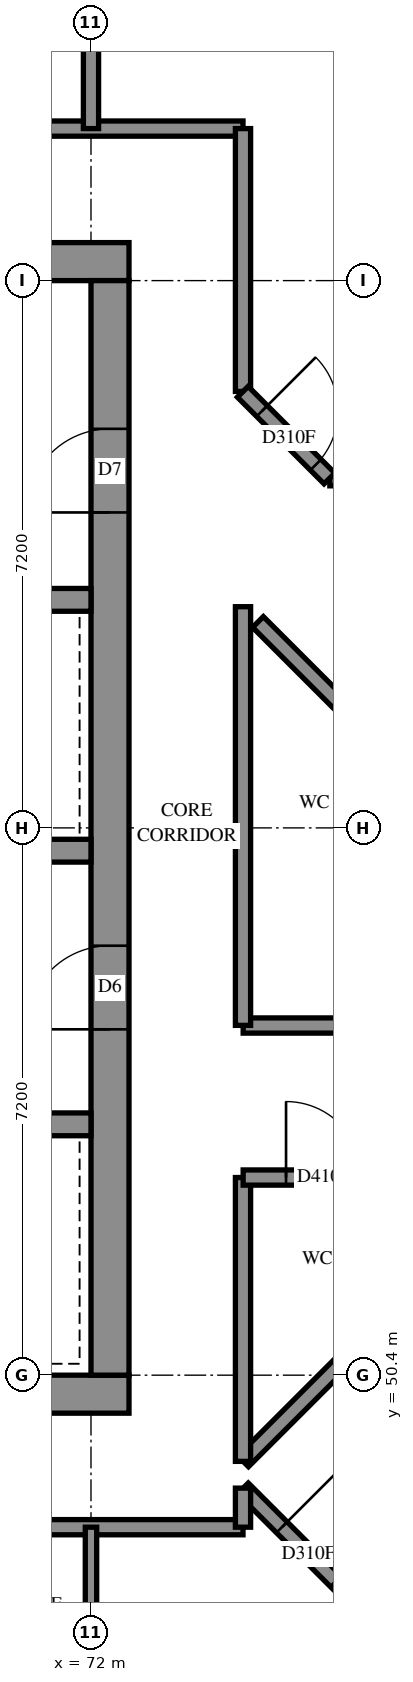
"""IFC4 building model, lengths in metres.
Left out: names, types, materials, properties, quantities, classifications, styles, units other than length and angle.
Written with IfcOpenShell. Run it as: python <this file> out.ifc"""

import sys

from ifc_helpers import new_model, si_unit, direction, frame, frame_2d, origin, place, context, subcontext, project, spatial, rectangle, extrude, element, fill, save


model = new_model("IFC4")
c1 = context("Model", 3, precision=1e-05, world=origin(), true_north=direction((0.0, 1.0)))
c2 = subcontext(c1, "Body", "Model", "MODEL_VIEW")
j1 = project(units=[si_unit("LENGTHUNIT", "METRE"), si_unit("PLANEANGLEUNIT", "RADIAN")], contexts=[c1])
p1 = place(None, origin())
s1 = spatial("IfcSite", under=j1, at=p1, CompositionType="ELEMENT")
p2 = place(p1, origin())
s2 = spatial("IfcBuilding", under=s1, at=p2, CompositionType="ELEMENT")
p3 = place(p2, frame((0.0, 0.0, 189.6)))
s3 = spatial("IfcBuildingStorey", under=s2, at=p3, CompositionType="ELEMENT", Elevation=189.6)
p4 = place(p3, frame((57.1, 50.15, -0.3), z_axis=(0.0, 0.0, 1.0), x_axis=(1.0, 0.0, 0.0)))
e1 = element("IfcWall", 1, at=p4, inside=s3, PredefinedType="SHEAR", context=c2, shape_type="SweptSolid", body=[
    extrude(rectangle(XDim=15.4, YDim=0.5, at=frame_2d((7.7, 0.0))), origin(), (0.0, 0.0, 1.0), 2.7),
])
p5 = place(p3, frame((57.1, 65.05, -0.3), z_axis=(0.0, 0.0, 1.0), x_axis=(1.0, 0.0, 0.0)))
e2 = element("IfcWall", 2, at=p5, inside=s3, PredefinedType="SHEAR", context=c2, shape_type="SweptSolid", body=[
    extrude(rectangle(XDim=15.4, YDim=0.5, at=frame_2d((7.7, 0.0))), origin(), (0.0, 0.0, 1.0), 2.7),
])
p6 = place(p5, frame((10.5, 0.0, 0.3)))
e3 = element("IfcOpeningElement", 3, at=p6, cuts=e2, PredefinedType="OPENING", context=c2, shape_type="SweptSolid", body=[
    extrude(rectangle(XDim=0.8, YDim=2.1, at=frame_2d((0.4, 1.05))), frame((0.0, 0.26, 0.0), z_axis=(0.0, -1.0, 0.0), x_axis=(1.0, 0.0, 0.0)), (0.0, 0.0, 1.0), 0.52),
])
p7 = place(p3, frame((72.25, 50.4, -0.3), z_axis=(0.0, 0.0, 1.0), x_axis=(0.0, 1.0, 0.0)))
e4 = element("IfcWall", 4, at=p7, inside=s3, PredefinedType="SHEAR", context=c2, shape_type="SweptSolid", body=[
    extrude(rectangle(XDim=14.4, YDim=0.5, at=frame_2d((7.2, 0.0))), origin(), (0.0, 0.0, 1.0), 2.7),
])
p8 = place(p7, frame((4.55, 0.0, 0.3)))
e5 = element("IfcOpeningElement", 5, at=p8, cuts=e4, PredefinedType="OPENING", context=c2, shape_type="SweptSolid", body=[
    extrude(rectangle(XDim=1.1, YDim=2.1, at=frame_2d((0.55, 1.05))), frame((0.0, 0.26, 0.0), z_axis=(0.0, -1.0, 0.0), x_axis=(1.0, 0.0, 0.0)), (0.0, 0.0, 1.0), 0.52),
])
p9 = place(p7, frame((11.35, 0.0, 0.3)))
e6 = element("IfcOpeningElement", 6, at=p9, cuts=e4, PredefinedType="OPENING", context=c2, shape_type="SweptSolid", body=[
    extrude(rectangle(XDim=1.1, YDim=2.1, at=frame_2d((0.55, 1.05))), frame((0.0, 0.26, 0.0), z_axis=(0.0, -1.0, 0.0), x_axis=(1.0, 0.0, 0.0)), (0.0, 0.0, 1.0), 0.52),
])
p10 = place(p3, frame((57.6, 53.7, 0.0), z_axis=(0.0, 0.0, 1.0), x_axis=(1.0, 0.0, 0.0)))
e7 = element("IfcWall", 7, at=p10, inside=s3, PredefinedType="SOLIDWALL", context=c2, shape_type="SweptSolid", body=[
    extrude(rectangle(XDim=14.4, YDim=0.3, at=frame_2d((7.2, 0.0))), origin(), (0.0, 0.0, 1.0), 3.1),
])
p11 = place(p10, frame((1.35, 0.0, 0.0)))
e8 = element("IfcOpeningElement", 8, at=p11, cuts=e7, PredefinedType="OPENING", context=c2, shape_type="SweptSolid", body=[
    extrude(rectangle(XDim=0.9, YDim=2.1, at=frame_2d((0.45, 1.05))), frame((0.0, 0.16, 0.0), z_axis=(0.0, -1.0, 0.0), x_axis=(1.0, 0.0, 0.0)), (0.0, 0.0, 1.0), 0.32),
])
p12 = place(p10, frame((4.95, 0.0, 0.0)))
e9 = element("IfcOpeningElement", 9, at=p12, cuts=e7, PredefinedType="OPENING", context=c2, shape_type="SweptSolid", body=[
    extrude(rectangle(XDim=0.9, YDim=2.1, at=frame_2d((0.45, 1.05))), frame((0.0, 0.16, 0.0), z_axis=(0.0, -1.0, 0.0), x_axis=(1.0, 0.0, 0.0)), (0.0, 0.0, 1.0), 0.32),
])
p13 = place(p10, frame((8.55, 0.0, 0.0)))
e10 = element("IfcOpeningElement", 10, at=p13, cuts=e7, PredefinedType="OPENING", context=c2, shape_type="SweptSolid", body=[
    extrude(rectangle(XDim=0.9, YDim=2.1, at=frame_2d((0.45, 1.05))), frame((0.0, 0.16, 0.0), z_axis=(0.0, -1.0, 0.0), x_axis=(1.0, 0.0, 0.0)), (0.0, 0.0, 1.0), 0.32),
])
p14 = place(p10, frame((12.05, 0.0, 0.0)))
e11 = element("IfcOpeningElement", 11, at=p14, cuts=e7, PredefinedType="OPENING", context=c2, shape_type="SweptSolid", body=[
    extrude(rectangle(XDim=1.1, YDim=2.1, at=frame_2d((0.55, 1.05))), frame((0.0, 0.16, 0.0), z_axis=(0.0, -1.0, 0.0), x_axis=(1.0, 0.0, 0.0)), (0.0, 0.0, 1.0), 0.32),
])
p15 = place(p3, frame((57.6, 57.3, 0.0), z_axis=(0.0, 0.0, 1.0), x_axis=(1.0, 0.0, 0.0)))
e12 = element("IfcWall", 12, at=p15, inside=s3, PredefinedType="SOLIDWALL", context=c2, shape_type="SweptSolid", body=[
    extrude(rectangle(XDim=14.4, YDim=0.3, at=frame_2d((7.2, 0.0))), origin(), (0.0, 0.0, 1.0), 3.1),
])
p16 = place(p15, frame((1.25, 0.0, 0.0)))
e13 = element("IfcOpeningElement", 13, at=p16, cuts=e12, PredefinedType="OPENING", context=c2, shape_type="SweptSolid", body=[
    extrude(rectangle(XDim=1.1, YDim=2.1, at=frame_2d((0.55, 1.05))), frame((0.0, 0.16, 0.0), z_axis=(0.0, -1.0, 0.0), x_axis=(1.0, 0.0, 0.0)), (0.0, 0.0, 1.0), 0.32),
])
p17 = place(p15, frame((4.85, 0.0, 0.0)))
e14 = element("IfcOpeningElement", 14, at=p17, cuts=e12, PredefinedType="OPENING", context=c2, shape_type="SweptSolid", body=[
    extrude(rectangle(XDim=1.1, YDim=2.1, at=frame_2d((0.55, 1.05))), frame((0.0, 0.16, 0.0), z_axis=(0.0, -1.0, 0.0), x_axis=(1.0, 0.0, 0.0)), (0.0, 0.0, 1.0), 0.32),
])
p18 = place(p15, frame((8.45, 0.0, 0.0)))
e15 = element("IfcOpeningElement", 15, at=p18, cuts=e12, PredefinedType="OPENING", context=c2, shape_type="SweptSolid", body=[
    extrude(rectangle(XDim=1.1, YDim=2.1, at=frame_2d((0.55, 1.05))), frame((0.0, 0.16, 0.0), z_axis=(0.0, -1.0, 0.0), x_axis=(1.0, 0.0, 0.0)), (0.0, 0.0, 1.0), 0.32),
])
p19 = place(p15, frame((12.05, 0.0, 0.0)))
e16 = element("IfcOpeningElement", 16, at=p19, cuts=e12, PredefinedType="OPENING", context=c2, shape_type="SweptSolid", body=[
    extrude(rectangle(XDim=1.1, YDim=2.1, at=frame_2d((0.55, 1.05))), frame((0.0, 0.16, 0.0), z_axis=(0.0, -1.0, 0.0), x_axis=(1.0, 0.0, 0.0)), (0.0, 0.0, 1.0), 0.32),
])
p20 = place(p3, frame((64.8, 60.6, 0.0), z_axis=(0.0, 0.0, 1.0), x_axis=(1.0, 0.0, 0.0)))
e17 = element("IfcWall", 17, at=p20, inside=s3, PredefinedType="SOLIDWALL", context=c2, shape_type="SweptSolid", body=[
    extrude(rectangle(XDim=7.2, YDim=0.3, at=frame_2d((3.6, 0.0))), origin(), (0.0, 0.0, 1.0), 3.1),
])
p21 = place(p3, frame((55.6, 48.4, 0.0), z_axis=(0.0, 0.0, 1.0), x_axis=(1.0, 0.0, 0.0)))
e18 = element("IfcWall", 18, at=p21, inside=s3, PredefinedType="PARTITIONING", context=c2, shape_type="SweptSolid", body=[
    extrude(rectangle(XDim=18.4, YDim=0.2, at=frame_2d((9.2, 0.0))), origin(), (0.0, 0.0, 1.0), 3.1),
])
p22 = place(p21, frame((5.862, 0.0, 0.0)))
e19 = element("IfcOpeningElement", 19, at=p22, cuts=e18, PredefinedType="OPENING", context=c2, shape_type="SweptSolid", body=[
    extrude(rectangle(XDim=1.0, YDim=2.1, at=frame_2d((0.5, 1.05))), frame((0.0, 0.11, 0.0), z_axis=(0.0, -1.0, 0.0), x_axis=(1.0, 0.0, 0.0)), (0.0, 0.0, 1.0), 0.22),
])
p23 = place(p21, frame((11.5, 0.0, 0.0)))
e20 = element("IfcOpeningElement", 20, at=p23, cuts=e18, PredefinedType="OPENING", context=c2, shape_type="SweptSolid", body=[
    extrude(rectangle(XDim=0.9, YDim=2.1, at=frame_2d((0.45, 1.05))), frame((0.0, 0.11, 0.0), z_axis=(0.0, -1.0, 0.0), x_axis=(1.0, 0.0, 0.0)), (0.0, 0.0, 1.0), 0.22),
])
p24 = place(p21, frame((13.2, 0.0, 0.0)))
e21 = element("IfcOpeningElement", 21, at=p24, cuts=e18, PredefinedType="OPENING", context=c2, shape_type="SweptSolid", body=[
    extrude(rectangle(XDim=0.9, YDim=2.1, at=frame_2d((0.45, 1.05))), frame((0.0, 0.11, 0.0), z_axis=(0.0, -1.0, 0.0), x_axis=(1.0, 0.0, 0.0)), (0.0, 0.0, 1.0), 0.22),
])
p25 = place(p3, frame((55.6, 66.8, 0.0), z_axis=(0.0, 0.0, 1.0), x_axis=(1.0, 0.0, 0.0)))
e22 = element("IfcWall", 22, at=p25, inside=s3, PredefinedType="PARTITIONING", context=c2, shape_type="SweptSolid", body=[
    extrude(rectangle(XDim=18.4, YDim=0.2, at=frame_2d((9.2, 0.0))), origin(), (0.0, 0.0, 1.0), 3.1),
])
p26 = place(p25, frame((5.886, 0.0, 0.0)))
e23 = element("IfcOpeningElement", 23, at=p26, cuts=e22, PredefinedType="OPENING", context=c2, shape_type="SweptSolid", body=[
    extrude(rectangle(XDim=1.0, YDim=2.1, at=frame_2d((0.5, 1.05))), frame((0.0, 0.11, 0.0), z_axis=(0.0, -1.0, 0.0), x_axis=(1.0, 0.0, 0.0)), (0.0, 0.0, 1.0), 0.22),
])
p27 = place(p25, frame((13.389, 0.0, 0.0)))
e24 = element("IfcOpeningElement", 24, at=p27, cuts=e22, PredefinedType="OPENING", context=c2, shape_type="SweptSolid", body=[
    extrude(rectangle(XDim=1.0, YDim=2.1, at=frame_2d((0.5, 1.05))), frame((0.0, 0.11, 0.0), z_axis=(0.0, -1.0, 0.0), x_axis=(1.0, 0.0, 0.0)), (0.0, 0.0, 1.0), 0.22),
])
p28 = place(p3, frame((73.999, 48.911, 0.0), z_axis=(0.0, 0.0, 1.0), x_axis=(0.7071067812, -0.7071067812, 0.0)))
e25 = element("IfcWall", 25, at=p28, inside=s3, PredefinedType="PARTITIONING", context=c2, shape_type="SweptSolid", body=[
    extrude(rectangle(XDim=5.745, YDim=0.2, at=frame_2d((2.872, 0.0))), origin(), (0.0, 0.0, 1.0), 3.1),
])
p29 = place(p28, frame((0.724, 0.0, 0.0)))
e26 = element("IfcOpeningElement", 26, at=p29, cuts=e25, PredefinedType="OPENING", context=c2, shape_type="SweptSolid", body=[
    extrude(rectangle(XDim=1.0, YDim=2.1, at=frame_2d((0.5, 1.05))), frame((0.0, 0.11, 0.0), z_axis=(0.0, -1.0, 0.0), x_axis=(1.0, 0.0, 0.0)), (0.0, 0.0, 1.0), 0.22),
])
p30 = place(p3, frame((74.002, 55.0, 0.0), z_axis=(0.0, 0.0, 1.0), x_axis=(1.0, 0.0, 0.0)))
e27 = element("IfcWall", 27, at=p30, inside=s3, PredefinedType="PARTITIONING", context=c2, shape_type="SweptSolid", body=[
    extrude(rectangle(XDim=5.508, YDim=0.2, at=frame_2d((2.754, 0.0))), origin(), (0.0, 0.0, 1.0), 3.1),
])
p31 = place(p30, frame((1.51, 0.0, 0.0)))
e28 = element("IfcOpeningElement", 28, at=p31, cuts=e27, PredefinedType="OPENING", context=c2, shape_type="SweptSolid", body=[
    extrude(rectangle(XDim=1.0, YDim=2.1, at=frame_2d((0.5, 1.05))), frame((0.0, 0.11, 0.0), z_axis=(0.0, -1.0, 0.0), x_axis=(1.0, 0.0, 0.0)), (0.0, 0.0, 1.0), 0.22),
])
p32 = place(p3, frame((74.0, 55.002, 0.0), z_axis=(0.0, 0.0, 1.0), x_axis=(0.0, 1.0, 0.0)))
e29 = element("IfcWall", 29, at=p32, inside=s3, PredefinedType="PARTITIONING", context=c2, shape_type="SweptSolid", body=[
    extrude(rectangle(XDim=5.508, YDim=0.2, at=frame_2d((2.754, 0.0))), origin(), (0.0, 0.0, 1.0), 3.1),
])
p33 = place(p3, frame((74.001, 49.267, 0.0), z_axis=(0.0, 0.0, 1.0), x_axis=(0.7071067812, 0.7071067812, 0.0)))
e30 = element("IfcWall", 30, at=p33, inside=s3, PredefinedType="PARTITIONING", context=c2, shape_type="SweptSolid", body=[
    extrude(rectangle(XDim=5.278, YDim=0.2, at=frame_2d((2.639, 0.0))), origin(), (0.0, 0.0, 1.0), 3.1),
])
p34 = place(p3, frame((74.197, 60.309, 0.0), z_axis=(0.0, 0.0, 1.0), x_axis=(0.7071067812, -0.7071067812, 0.0)))
e31 = element("IfcWall", 31, at=p34, inside=s3, PredefinedType="PARTITIONING", context=c2, shape_type="SweptSolid", body=[
    extrude(rectangle(XDim=4.738, YDim=0.2, at=frame_2d((2.369, 0.0))), origin(), (0.0, 0.0, 1.0), 3.1),
])
p35 = place(p3, frame((72.0, 66.8, 0.0), z_axis=(0.0, 0.0, 1.0), x_axis=(0.0, 1.0, 0.0)))
e32 = element("IfcWall", 32, at=p35, inside=s3, PredefinedType="PARTITIONING", context=c2, shape_type="SweptSolid", body=[
    extrude(rectangle(XDim=4.696, YDim=0.2, at=frame_2d((2.348, 0.0))), origin(), (0.0, 0.0, 1.0), 3.1),
])
p36 = place(p3, frame((75.142, 62.2, 0.0), z_axis=(0.0, 0.0, 1.0), x_axis=(1.0, 0.0, 0.0)))
e33 = element("IfcWall", 33, at=p36, inside=s3, PredefinedType="PARTITIONING", context=c2, shape_type="SweptSolid", body=[
    extrude(rectangle(XDim=4.058, YDim=0.2, at=frame_2d((2.029, 0.0))), origin(), (0.0, 0.0, 1.0), 3.1),
])
p37 = place(p36, frame((2.808, 0.0, 0.0)))
e34 = element("IfcOpeningElement", 34, at=p37, cuts=e33, PredefinedType="OPENING", context=c2, shape_type="SweptSolid", body=[
    extrude(rectangle(XDim=0.9, YDim=2.1, at=frame_2d((0.45, 1.05))), frame((0.0, 0.11, 0.0), z_axis=(0.0, -1.0, 0.0), x_axis=(1.0, 0.0, 0.0)), (0.0, 0.0, 1.0), 0.22),
])
p38 = place(p3, frame((74.0, 49.266, 0.0), z_axis=(0.0, 0.0, 1.0), x_axis=(0.0, 1.0, 0.0)))
e35 = element("IfcWall", 35, at=p38, inside=s3, PredefinedType="PARTITIONING", context=c2, shape_type="SweptSolid", body=[
    extrude(rectangle(XDim=3.734, YDim=0.2, at=frame_2d((1.867, 0.0))), origin(), (0.0, 0.0, 1.0), 3.1),
])
p39 = place(p3, frame((74.002, 53.0, 0.0), z_axis=(0.0, 0.0, 1.0), x_axis=(1.0, 0.0, 0.0)))
e36 = element("IfcWall", 36, at=p39, inside=s3, PredefinedType="PARTITIONING", context=c2, shape_type="SweptSolid", body=[
    extrude(rectangle(XDim=3.732, YDim=0.2, at=frame_2d((1.866, 0.0))), origin(), (0.0, 0.0, 1.0), 3.1),
])
p40 = place(p39, frame((0.564, 0.0, 0.0)))
e37 = element("IfcOpeningElement", 37, at=p40, cuts=e36, PredefinedType="OPENING", context=c2, shape_type="SweptSolid", body=[
    extrude(rectangle(XDim=1.0, YDim=2.1, at=frame_2d((0.5, 1.05))), frame((0.0, 0.11, 0.0), z_axis=(0.0, -1.0, 0.0), x_axis=(1.0, 0.0, 0.0)), (0.0, 0.0, 1.0), 0.22),
])
p41 = place(p3, frame((74.0, 63.342, 0.0), z_axis=(0.0, 0.0, 1.0), x_axis=(0.0, 1.0, 0.0)))
e38 = element("IfcWall", 38, at=p41, inside=s3, PredefinedType="PARTITIONING", context=c2, shape_type="SweptSolid", body=[
    extrude(rectangle(XDim=3.458, YDim=0.2, at=frame_2d((1.729, 0.0))), origin(), (0.0, 0.0, 1.0), 3.1),
])
p42 = place(p3, frame((72.0, 46.0, 0.0), z_axis=(0.0, 0.0, 1.0), x_axis=(0.0, 1.0, 0.0)))
e39 = element("IfcWall", 39, at=p42, inside=s3, PredefinedType="PARTITIONING", context=c2, shape_type="SweptSolid", body=[
    extrude(rectangle(XDim=2.4, YDim=0.15, at=frame_2d((1.2, 0.0))), origin(), (0.0, 0.0, 1.0), 3.1),
])
p43 = place(p3, frame((73.997, 63.337, 0.0), z_axis=(0.0, 0.0, 1.0), x_axis=(0.7071067812, -0.7071067812, 0.0)))
e40 = element("IfcWall", 40, at=p43, inside=s3, PredefinedType="PARTITIONING", context=c2, shape_type="SweptSolid", body=[
    extrude(rectangle(XDim=1.612, YDim=0.2, at=frame_2d((0.806, 0.0))), origin(), (0.0, 0.0, 1.0), 3.1),
])
p44 = place(p43, frame((0.357, 0.0, 0.0)))
e41 = element("IfcOpeningElement", 41, at=p44, cuts=e40, PredefinedType="OPENING", context=c2, shape_type="SweptSolid", body=[
    extrude(rectangle(XDim=1.0, YDim=2.1, at=frame_2d((0.5, 1.05))), frame((0.0, 0.11, 0.0), z_axis=(0.0, -1.0, 0.0), x_axis=(1.0, 0.0, 0.0)), (0.0, 0.0, 1.0), 0.22),
])
p45 = place(p3, frame((74.0, 48.4, 0.0), z_axis=(0.0, 0.0, 1.0), x_axis=(0.0, 1.0, 0.0)))
e42 = element("IfcWall", 42, at=p45, inside=s3, PredefinedType="PARTITIONING", context=c2, shape_type="SweptSolid", body=[
    extrude(rectangle(XDim=0.514, YDim=0.2, at=frame_2d((0.257, 0.0))), origin(), (0.0, 0.0, 1.0), 3.1),
])
p46 = place(p8, origin())
e43 = element("IfcDoor", 43, at=p46, inside=s3, OperationType="DOUBLE_DOOR_SINGLE_SWING", PredefinedType="DOOR", context=c2, shape_type="SweptSolid", body=[
    extrude(rectangle(XDim=1.1, YDim=2.1, at=frame_2d((0.55, 1.05))), frame((0.0, 0.025, 0.0), z_axis=(0.0, -1.0, 0.0), x_axis=(1.0, 0.0, 0.0)), (0.0, 0.0, 1.0), 0.05),
])
fill(e5, e43)
p47 = place(p9, origin())
e44 = element("IfcDoor", 44, at=p47, inside=s3, OperationType="SINGLE_SWING_RIGHT", PredefinedType="DOOR", context=c2, shape_type="SweptSolid", body=[
    extrude(rectangle(XDim=1.1, YDim=2.1, at=frame_2d((0.55, 1.05))), frame((0.0, 0.025, 0.0), z_axis=(0.0, -1.0, 0.0), x_axis=(1.0, 0.0, 0.0)), (0.0, 0.0, 1.0), 0.05),
])
fill(e6, e44)
p48 = place(p40, origin())
e45 = element("IfcDoor", 45, at=p48, inside=s3, OperationType="SINGLE_SWING_RIGHT", PredefinedType="DOOR", context=c2, shape_type="SweptSolid", body=[
    extrude(rectangle(XDim=1.0, YDim=2.1, at=frame_2d((0.5, 1.05))), frame((0.0, 0.025, 0.0), z_axis=(0.0, -1.0, 0.0), x_axis=(1.0, 0.0, 0.0)), (0.0, 0.0, 1.0), 0.05),
])
fill(e37, e45)
p49 = place(p44, origin())
e46 = element("IfcDoor", 46, at=p49, inside=s3, OperationType="SINGLE_SWING_RIGHT", PredefinedType="DOOR", context=c2, shape_type="SweptSolid", body=[
    extrude(rectangle(XDim=1.0, YDim=2.1, at=frame_2d((0.5, 1.05))), frame((0.0, 0.025, 0.0), z_axis=(0.0, -1.0, 0.0), x_axis=(1.0, 0.0, 0.0)), (0.0, 0.0, 1.0), 0.05),
])
fill(e41, e46)
p50 = place(p29, origin())
e47 = element("IfcDoor", 47, at=p50, inside=s3, OperationType="SINGLE_SWING_LEFT", PredefinedType="DOOR", context=c2, shape_type="SweptSolid", body=[
    extrude(rectangle(XDim=1.0, YDim=2.1, at=frame_2d((0.5, 1.05))), frame((0.0, 0.025, 0.0), z_axis=(0.0, -1.0, 0.0), x_axis=(1.0, 0.0, 0.0)), (0.0, 0.0, 1.0), 0.05),
])
fill(e26, e47)
save(model, sys.argv[1])
